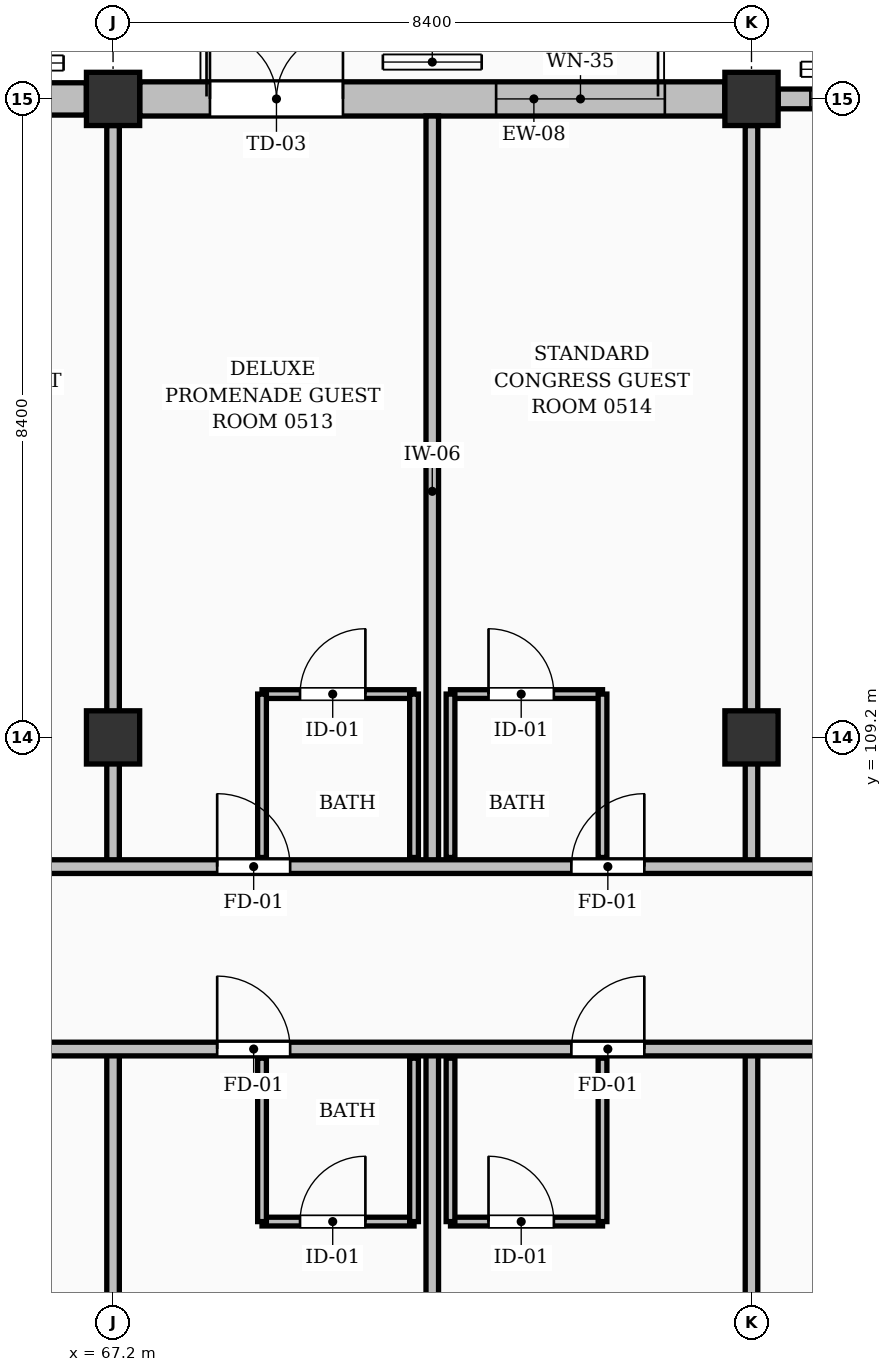
"""IFC4 building model, lengths in metres.
Left out: names, types, materials, properties, quantities, classifications, styles, units other than length and angle.
Written with IfcOpenShell. Run it as: python <this file> out.ifc"""

import sys

from ifc_helpers import new_model, si_unit, direction, frame, frame_2d, origin, origin_2d, place, context, subcontext, project, spatial, rectangle, extrude, element, fill, save


model = new_model("IFC4")
c1 = context("Model", 3, precision=1e-05, world=origin(), true_north=direction((0.0, 1.0)))
c2 = subcontext(c1, "Body", "Model", "MODEL_VIEW")
j1 = project(units=[si_unit("LENGTHUNIT", "METRE"), si_unit("PLANEANGLEUNIT", "RADIAN")], contexts=[c1])
p1 = place(None, origin())
s1 = spatial("IfcSite", under=j1, at=p1, CompositionType="ELEMENT")
p2 = place(p1, origin())
s2 = spatial("IfcBuilding", under=s1, at=p2, CompositionType="ELEMENT")
p3 = place(p2, frame((0.0, 0.0, 18.48)))
s3 = spatial("IfcBuildingStorey", under=s2, at=p3, CompositionType="ELEMENT", Elevation=18.48)
for number, where, z_axis, x_axis in (
    (1, (67.2, 109.2, 0.0), (0.0, 0.0, 1.0), (1.0, 0.0, 0.0)),
    (2, (67.2, 117.6, 0.0), (0.0, 0.0, 1.0), (1.0, 0.0, 0.0)),
    (3, (75.6, 109.2, 0.0), (0.0, 0.0, 1.0), (1.0, 0.0, 0.0)),
    (4, (75.6, 117.6, 0.0), (0.0, 0.0, 1.0), (1.0, 0.0, 0.0)),
):
    element("IfcColumn", number, at=place(p3, frame(where, z_axis=z_axis, x_axis=x_axis)), inside=s3, PredefinedType="COLUMN", context=c2, shape_type="SweptSolid", body=[
        extrude(rectangle(XDim=0.7, YDim=0.7, at=origin_2d()), origin(), (0.0, 0.0, 1.0), 3.36),
    ])
p4 = place(p3, frame((59.151, 117.6, 0.0), z_axis=(0.0, 0.0, 1.0), x_axis=(1.0, 0.0, 0.0)))
e5 = element("IfcWall", 5, at=p4, inside=s3, PredefinedType="SOLIDWALL", context=c2, shape_type="SweptSolid", body=[
    extrude(rectangle(XDim=7.698, YDim=0.425, at=frame_2d((3.849, 0.0))), origin(), (0.0, 0.0, 1.0), 2.494),
])
p5 = place(p4, frame((0.559, 0.0, 0.25)))
e6 = element("IfcOpeningElement", 6, at=p5, cuts=e5, PredefinedType="OPENING", context=c2, shape_type="SweptSolid", body=[
    extrude(rectangle(XDim=2.38, YDim=2.0, at=frame_2d((1.19, 1.0))), frame((0.0, 0.223, 0.0), z_axis=(0.0, -1.0, 0.0), x_axis=(1.0, 0.0, 0.0)), (0.0, 0.0, 1.0), 0.445),
])
p6 = place(p4, frame((4.774, 0.0, 0.25)))
e7 = element("IfcOpeningElement", 7, at=p6, cuts=e5, PredefinedType="OPENING", context=c2, shape_type="SweptSolid", body=[
    extrude(rectangle(XDim=2.35, YDim=1.85, at=frame_2d((1.175, 0.925))), frame((0.0, 0.223, 0.0), z_axis=(0.0, -1.0, 0.0), x_axis=(1.0, 0.0, 0.0)), (0.0, 0.0, 1.0), 0.445),
])
p7 = place(p3, frame((67.551, 117.6, 0.0), z_axis=(0.0, 0.0, 1.0), x_axis=(1.0, 0.0, 0.0)))
e8 = element("IfcWall", 8, at=p7, inside=s3, PredefinedType="SOLIDWALL", context=c2, shape_type="SweptSolid", body=[
    extrude(rectangle(XDim=7.698, YDim=0.45, at=frame_2d((3.849, 0.0))), origin(), (0.0, 0.0, 1.0), 2.414),
])
p8 = place(p7, frame((0.924, 0.0, 0.0)))
e9 = element("IfcOpeningElement", 9, at=p8, cuts=e8, PredefinedType="OPENING", context=c2, shape_type="SweptSolid", body=[
    extrude(rectangle(XDim=1.75, YDim=2.08, at=frame_2d((0.875, 1.04))), frame((0.0, 0.235, 0.0), z_axis=(0.0, -1.0, 0.0), x_axis=(1.0, 0.0, 0.0)), (0.0, 0.0, 1.0), 0.47),
])
p9 = place(p7, frame((4.689, 0.0, 0.25)))
e10 = element("IfcOpeningElement", 10, at=p9, cuts=e8, PredefinedType="OPENING", context=c2, shape_type="SweptSolid", body=[
    extrude(rectangle(XDim=2.22, YDim=1.9, at=frame_2d((1.11, 0.95))), frame((0.0, 0.235, 0.0), z_axis=(0.0, -1.0, 0.0), x_axis=(1.0, 0.0, 0.0)), (0.0, 0.0, 1.0), 0.47),
])
p10 = place(p3, frame((75.951, 117.6, 0.0), z_axis=(0.0, 0.0, 1.0), x_axis=(1.0, 0.0, 0.0)))
e11 = element("IfcWall", 11, at=p10, inside=s3, PredefinedType="SOLIDWALL", context=c2, shape_type="SweptSolid", body=[
    extrude(rectangle(XDim=7.698, YDim=0.26, at=frame_2d((3.849, 0.0))), origin(), (0.0, 0.0, 1.0), 2.414),
])
p11 = place(p10, frame((0.424, 0.0, 0.25)))
e12 = element("IfcOpeningElement", 12, at=p11, cuts=e11, PredefinedType="OPENING", context=c2, shape_type="SweptSolid", body=[
    extrude(rectangle(XDim=2.65, YDim=1.85, at=frame_2d((1.325, 0.925))), frame((0.0, 0.14, 0.0), z_axis=(0.0, -1.0, 0.0), x_axis=(1.0, 0.0, 0.0)), (0.0, 0.0, 1.0), 0.28),
])
p12 = place(p10, frame((4.724, 0.0, 0.25)))
e13 = element("IfcOpeningElement", 13, at=p12, cuts=e11, PredefinedType="OPENING", context=c2, shape_type="SweptSolid", body=[
    extrude(rectangle(XDim=2.45, YDim=1.95, at=frame_2d((1.225, 0.975))), frame((0.0, 0.14, 0.0), z_axis=(0.0, -1.0, 0.0), x_axis=(1.0, 0.0, 0.0)), (0.0, 0.0, 1.0), 0.28),
])
p13 = place(p3, frame((69.16, 109.77, 0.0), z_axis=(0.0, 0.0, 1.0), x_axis=(1.0, 0.0, 0.0)))
e14 = element("IfcWall", 14, at=p13, inside=s3, PredefinedType="PARTITIONING", context=c2, shape_type="SweptSolid", body=[
    extrude(rectangle(XDim=2.0, YDim=0.115, at=frame_2d((1.0, 0.0))), origin(), (0.0, 0.0, 1.0), 3.12),
])
p14 = place(p13, frame((0.5, 0.0, 0.0)))
e15 = element("IfcOpeningElement", 15, at=p14, cuts=e14, PredefinedType="OPENING", context=c2, shape_type="SweptSolid", body=[
    extrude(rectangle(XDim=0.86, YDim=2.05, at=frame_2d((0.43, 1.025))), frame((0.0, 0.067, 0.0), z_axis=(0.0, -1.0, 0.0), x_axis=(1.0, 0.0, 0.0)), (0.0, 0.0, 1.0), 0.135),
])
for number, where, z_axis, x_axis in (
    (16, (69.16, 107.62, 0.0), (0.0, 0.0, 1.0), (0.0, 1.0, 0.0)),
    (17, (71.16, 107.62, 0.0), (0.0, 0.0, 1.0), (0.0, 1.0, 0.0)),
):
    element("IfcWall", number, at=place(p3, frame(where, z_axis=z_axis, x_axis=x_axis)), inside=s3, PredefinedType="PARTITIONING", context=c2, shape_type="SweptSolid", body=[
        extrude(rectangle(XDim=2.15, YDim=0.115, at=frame_2d((1.075, 0.0))), origin(), (0.0, 0.0, 1.0), 3.12),
    ])
p15 = place(p3, frame((71.64, 109.77, 0.0), z_axis=(0.0, 0.0, 1.0), x_axis=(1.0, 0.0, 0.0)))
e18 = element("IfcWall", 18, at=p15, inside=s3, PredefinedType="PARTITIONING", context=c2, shape_type="SweptSolid", body=[
    extrude(rectangle(XDim=2.0, YDim=0.115, at=frame_2d((1.0, 0.0))), origin(), (0.0, 0.0, 1.0), 3.12),
])
p16 = place(p15, frame((0.5, 0.0, 0.0)))
e19 = element("IfcOpeningElement", 19, at=p16, cuts=e18, PredefinedType="OPENING", context=c2, shape_type="SweptSolid", body=[
    extrude(rectangle(XDim=0.86, YDim=2.05, at=frame_2d((0.43, 1.025))), frame((0.0, 0.067, 0.0), z_axis=(0.0, -1.0, 0.0), x_axis=(1.0, 0.0, 0.0)), (0.0, 0.0, 1.0), 0.135),
])
for number, where, z_axis, x_axis in (
    (20, (71.64, 107.62, 0.0), (0.0, 0.0, 1.0), (0.0, 1.0, 0.0)),
    (21, (73.64, 107.62, 0.0), (0.0, 0.0, 1.0), (0.0, 1.0, 0.0)),
):
    element("IfcWall", number, at=place(p3, frame(where, z_axis=z_axis, x_axis=x_axis)), inside=s3, PredefinedType="PARTITIONING", context=c2, shape_type="SweptSolid", body=[
        extrude(rectangle(XDim=2.15, YDim=0.115, at=frame_2d((1.075, 0.0))), origin(), (0.0, 0.0, 1.0), 3.12),
    ])
p17 = place(p3, frame((71.4, 107.5, 0.0), z_axis=(0.0, 0.0, 1.0), x_axis=(0.0, 1.0, 0.0)))
e22 = element("IfcWall", 22, at=p17, inside=s3, PredefinedType="PARTITIONING", context=c2, shape_type="SweptSolid", body=[
    extrude(rectangle(XDim=9.875, YDim=0.165, at=frame_2d((4.938, 0.0))), origin(), (0.0, 0.0, 1.0), 3.12),
])
for number, where, z_axis, x_axis in (
    (23, (67.2, 107.5, 0.0), (0.0, 0.0, 1.0), (0.0, 1.0, 0.0)),
    (24, (75.6, 107.5, 0.0), (0.0, 0.0, 1.0), (0.0, 1.0, 0.0)),
):
    element("IfcWall", number, at=place(p3, frame(where, z_axis=z_axis, x_axis=x_axis)), inside=s3, PredefinedType="PARTITIONING", context=c2, shape_type="SweptSolid", body=[
        extrude(rectangle(XDim=9.75, YDim=0.165, at=frame_2d((4.875, 0.0))), origin(), (0.0, 0.0, 1.0), 2.375),
    ])
p18 = place(p3, frame((40.66, 107.5, 0.0), z_axis=(0.0, 0.0, 1.0), x_axis=(1.0, 0.0, 0.0)))
e25 = element("IfcWall", 25, at=p18, inside=s3, PredefinedType="PARTITIONING", context=c2, shape_type="SweptSolid", body=[
    extrude(rectangle(XDim=43.21, YDim=0.18, at=frame_2d((21.605, 0.0))), origin(), (0.0, 0.0, 1.0), 3.12),
])
p19 = place(p18, frame((0.2, 0.0, 0.0)))
e26 = element("IfcOpeningElement", 26, at=p19, cuts=e25, PredefinedType="OPENING", context=c2, shape_type="SweptSolid", body=[
    extrude(rectangle(XDim=0.94, YDim=2.1, at=frame_2d((0.47, 1.05))), frame((0.0, 0.1, 0.0), z_axis=(0.0, -1.0, 0.0), x_axis=(1.0, 0.0, 0.0)), (0.0, 0.0, 1.0), 0.2),
])
p20 = place(p18, frame((2.71, 0.0, 0.0)))
e27 = element("IfcOpeningElement", 27, at=p20, cuts=e25, PredefinedType="OPENING", context=c2, shape_type="SweptSolid", body=[
    extrude(rectangle(XDim=0.96, YDim=2.15, at=frame_2d((0.48, 1.075))), frame((0.0, 0.1, 0.0), z_axis=(0.0, -1.0, 0.0), x_axis=(1.0, 0.0, 0.0)), (0.0, 0.0, 1.0), 0.2),
])
p21 = place(p18, frame((7.37, 0.0, 0.0)))
e28 = element("IfcOpeningElement", 28, at=p21, cuts=e25, PredefinedType="OPENING", context=c2, shape_type="SweptSolid", body=[
    extrude(rectangle(XDim=0.96, YDim=2.15, at=frame_2d((0.48, 1.075))), frame((0.0, 0.1, 0.0), z_axis=(0.0, -1.0, 0.0), x_axis=(1.0, 0.0, 0.0)), (0.0, 0.0, 1.0), 0.2),
])
p22 = place(p18, frame((11.11, 0.0, 0.0)))
e29 = element("IfcOpeningElement", 29, at=p22, cuts=e25, PredefinedType="OPENING", context=c2, shape_type="SweptSolid", body=[
    extrude(rectangle(XDim=0.96, YDim=2.15, at=frame_2d((0.48, 1.075))), frame((0.0, 0.1, 0.0), z_axis=(0.0, -1.0, 0.0), x_axis=(1.0, 0.0, 0.0)), (0.0, 0.0, 1.0), 0.2),
])
p23 = place(p18, frame((15.77, 0.0, 0.0)))
e30 = element("IfcOpeningElement", 30, at=p23, cuts=e25, PredefinedType="OPENING", context=c2, shape_type="SweptSolid", body=[
    extrude(rectangle(XDim=0.96, YDim=2.15, at=frame_2d((0.48, 1.075))), frame((0.0, 0.1, 0.0), z_axis=(0.0, -1.0, 0.0), x_axis=(1.0, 0.0, 0.0)), (0.0, 0.0, 1.0), 0.2),
])
p24 = place(p18, frame((19.51, 0.0, 0.0)))
e31 = element("IfcOpeningElement", 31, at=p24, cuts=e25, PredefinedType="OPENING", context=c2, shape_type="SweptSolid", body=[
    extrude(rectangle(XDim=0.96, YDim=2.15, at=frame_2d((0.48, 1.075))), frame((0.0, 0.1, 0.0), z_axis=(0.0, -1.0, 0.0), x_axis=(1.0, 0.0, 0.0)), (0.0, 0.0, 1.0), 0.2),
])
p25 = place(p18, frame((24.17, 0.0, 0.0)))
e32 = element("IfcOpeningElement", 32, at=p25, cuts=e25, PredefinedType="OPENING", context=c2, shape_type="SweptSolid", body=[
    extrude(rectangle(XDim=0.96, YDim=2.15, at=frame_2d((0.48, 1.075))), frame((0.0, 0.1, 0.0), z_axis=(0.0, -1.0, 0.0), x_axis=(1.0, 0.0, 0.0)), (0.0, 0.0, 1.0), 0.2),
])
p26 = place(p18, frame((27.91, 0.0, 0.0)))
e33 = element("IfcOpeningElement", 33, at=p26, cuts=e25, PredefinedType="OPENING", context=c2, shape_type="SweptSolid", body=[
    extrude(rectangle(XDim=0.96, YDim=2.15, at=frame_2d((0.48, 1.075))), frame((0.0, 0.1, 0.0), z_axis=(0.0, -1.0, 0.0), x_axis=(1.0, 0.0, 0.0)), (0.0, 0.0, 1.0), 0.2),
])
p27 = place(p18, frame((32.57, 0.0, 0.0)))
e34 = element("IfcOpeningElement", 34, at=p27, cuts=e25, PredefinedType="OPENING", context=c2, shape_type="SweptSolid", body=[
    extrude(rectangle(XDim=0.96, YDim=2.15, at=frame_2d((0.48, 1.075))), frame((0.0, 0.1, 0.0), z_axis=(0.0, -1.0, 0.0), x_axis=(1.0, 0.0, 0.0)), (0.0, 0.0, 1.0), 0.2),
])
p28 = place(p18, frame((36.44, 0.0, 0.0)))
e35 = element("IfcOpeningElement", 35, at=p28, cuts=e25, PredefinedType="OPENING", context=c2, shape_type="SweptSolid", body=[
    extrude(rectangle(XDim=1.02, YDim=2.15, at=frame_2d((0.51, 1.075))), frame((0.0, 0.1, 0.0), z_axis=(0.0, -1.0, 0.0), x_axis=(1.0, 0.0, 0.0)), (0.0, 0.0, 1.0), 0.2),
])
p29 = place(p3, frame((69.16, 102.83, 0.0), z_axis=(0.0, 0.0, 1.0), x_axis=(1.0, 0.0, 0.0)))
e36 = element("IfcWall", 36, at=p29, inside=s3, PredefinedType="PARTITIONING", context=c2, shape_type="SweptSolid", body=[
    extrude(rectangle(XDim=2.0, YDim=0.115, at=frame_2d((1.0, 0.0))), origin(), (0.0, 0.0, 1.0), 3.12),
])
p30 = place(p29, frame((0.5, 0.0, 0.0)))
e37 = element("IfcOpeningElement", 37, at=p30, cuts=e36, PredefinedType="OPENING", context=c2, shape_type="SweptSolid", body=[
    extrude(rectangle(XDim=0.86, YDim=2.05, at=frame_2d((0.43, 1.025))), frame((0.0, 0.067, 0.0), z_axis=(0.0, -1.0, 0.0), x_axis=(1.0, 0.0, 0.0)), (0.0, 0.0, 1.0), 0.135),
])
for number, where, z_axis, x_axis in (
    (38, (69.16, 102.83, 0.0), (0.0, 0.0, 1.0), (0.0, 1.0, 0.0)),
    (39, (71.16, 102.83, 0.0), (0.0, 0.0, 1.0), (0.0, 1.0, 0.0)),
):
    element("IfcWall", number, at=place(p3, frame(where, z_axis=z_axis, x_axis=x_axis)), inside=s3, PredefinedType="PARTITIONING", context=c2, shape_type="SweptSolid", body=[
        extrude(rectangle(XDim=2.15, YDim=0.115, at=frame_2d((1.075, 0.0))), origin(), (0.0, 0.0, 1.0), 3.12),
    ])
p31 = place(p3, frame((71.64, 102.83, 0.0), z_axis=(0.0, 0.0, 1.0), x_axis=(1.0, 0.0, 0.0)))
e40 = element("IfcWall", 40, at=p31, inside=s3, PredefinedType="PARTITIONING", context=c2, shape_type="SweptSolid", body=[
    extrude(rectangle(XDim=2.0, YDim=0.115, at=frame_2d((1.0, 0.0))), origin(), (0.0, 0.0, 1.0), 3.12),
])
p32 = place(p31, frame((0.5, 0.0, 0.0)))
e41 = element("IfcOpeningElement", 41, at=p32, cuts=e40, PredefinedType="OPENING", context=c2, shape_type="SweptSolid", body=[
    extrude(rectangle(XDim=0.86, YDim=2.05, at=frame_2d((0.43, 1.025))), frame((0.0, 0.067, 0.0), z_axis=(0.0, -1.0, 0.0), x_axis=(1.0, 0.0, 0.0)), (0.0, 0.0, 1.0), 0.135),
])
for number, where, z_axis, x_axis in (
    (42, (71.64, 102.83, 0.0), (0.0, 0.0, 1.0), (0.0, 1.0, 0.0)),
    (43, (73.64, 102.83, 0.0), (0.0, 0.0, 1.0), (0.0, 1.0, 0.0)),
):
    element("IfcWall", number, at=place(p3, frame(where, z_axis=z_axis, x_axis=x_axis)), inside=s3, PredefinedType="PARTITIONING", context=c2, shape_type="SweptSolid", body=[
        extrude(rectangle(XDim=2.15, YDim=0.115, at=frame_2d((1.075, 0.0))), origin(), (0.0, 0.0, 1.0), 3.12),
    ])
p33 = place(p3, frame((71.4, 92.625, 0.0), z_axis=(0.0, 0.0, 1.0), x_axis=(0.0, 1.0, 0.0)))
e44 = element("IfcWall", 44, at=p33, inside=s3, PredefinedType="PARTITIONING", context=c2, shape_type="SweptSolid", body=[
    extrude(rectangle(XDim=12.475, YDim=0.165, at=frame_2d((6.238, 0.0))), origin(), (0.0, 0.0, 1.0), 3.12),
])
for number, where, z_axis, x_axis in (
    (45, (67.2, 92.75, 0.0), (0.0, 0.0, 1.0), (0.0, 1.0, 0.0)),
    (46, (75.6, 92.75, 0.0), (0.0, 0.0, 1.0), (0.0, 1.0, 0.0)),
):
    element("IfcWall", number, at=place(p3, frame(where, z_axis=z_axis, x_axis=x_axis)), inside=s3, PredefinedType="PARTITIONING", context=c2, shape_type="SweptSolid", body=[
        extrude(rectangle(XDim=12.35, YDim=0.165, at=frame_2d((6.175, 0.0))), origin(), (0.0, 0.0, 1.0), 2.375),
    ])
p34 = place(p3, frame((54.4, 105.1, 0.0), z_axis=(0.0, 0.0, 1.0), x_axis=(1.0, 0.0, 0.0)))
e47 = element("IfcWall", 47, at=p34, inside=s3, PredefinedType="PARTITIONING", context=c2, shape_type="SweptSolid", body=[
    extrude(rectangle(XDim=29.47, YDim=0.18, at=frame_2d((14.735, 0.0))), origin(), (0.0, 0.0, 1.0), 3.12),
])
p35 = place(p34, frame((2.03, 0.0, 0.0)))
e48 = element("IfcOpeningElement", 48, at=p35, cuts=e47, PredefinedType="OPENING", context=c2, shape_type="SweptSolid", body=[
    extrude(rectangle(XDim=0.96, YDim=2.15, at=frame_2d((0.48, 1.075))), frame((0.0, 0.1, 0.0), z_axis=(0.0, -1.0, 0.0), x_axis=(1.0, 0.0, 0.0)), (0.0, 0.0, 1.0), 0.2),
])
p36 = place(p34, frame((5.77, 0.0, 0.0)))
e49 = element("IfcOpeningElement", 49, at=p36, cuts=e47, PredefinedType="OPENING", context=c2, shape_type="SweptSolid", body=[
    extrude(rectangle(XDim=0.96, YDim=2.15, at=frame_2d((0.48, 1.075))), frame((0.0, 0.1, 0.0), z_axis=(0.0, -1.0, 0.0), x_axis=(1.0, 0.0, 0.0)), (0.0, 0.0, 1.0), 0.2),
])
p37 = place(p34, frame((10.43, 0.0, 0.0)))
e50 = element("IfcOpeningElement", 50, at=p37, cuts=e47, PredefinedType="OPENING", context=c2, shape_type="SweptSolid", body=[
    extrude(rectangle(XDim=0.96, YDim=2.15, at=frame_2d((0.48, 1.075))), frame((0.0, 0.1, 0.0), z_axis=(0.0, -1.0, 0.0), x_axis=(1.0, 0.0, 0.0)), (0.0, 0.0, 1.0), 0.2),
])
p38 = place(p34, frame((14.17, 0.0, 0.0)))
e51 = element("IfcOpeningElement", 51, at=p38, cuts=e47, PredefinedType="OPENING", context=c2, shape_type="SweptSolid", body=[
    extrude(rectangle(XDim=0.96, YDim=2.15, at=frame_2d((0.48, 1.075))), frame((0.0, 0.1, 0.0), z_axis=(0.0, -1.0, 0.0), x_axis=(1.0, 0.0, 0.0)), (0.0, 0.0, 1.0), 0.2),
])
p39 = place(p34, frame((18.83, 0.0, 0.0)))
e52 = element("IfcOpeningElement", 52, at=p39, cuts=e47, PredefinedType="OPENING", context=c2, shape_type="SweptSolid", body=[
    extrude(rectangle(XDim=0.96, YDim=2.15, at=frame_2d((0.48, 1.075))), frame((0.0, 0.1, 0.0), z_axis=(0.0, -1.0, 0.0), x_axis=(1.0, 0.0, 0.0)), (0.0, 0.0, 1.0), 0.2),
])
p40 = place(p34, frame((22.7, 0.0, 0.0)))
e53 = element("IfcOpeningElement", 53, at=p40, cuts=e47, PredefinedType="OPENING", context=c2, shape_type="SweptSolid", body=[
    extrude(rectangle(XDim=1.02, YDim=2.15, at=frame_2d((0.51, 1.075))), frame((0.0, 0.1, 0.0), z_axis=(0.0, -1.0, 0.0), x_axis=(1.0, 0.0, 0.0)), (0.0, 0.0, 1.0), 0.2),
])
p41 = place(p8, origin())
e54 = element("IfcDoor", 54, at=p41, inside=s3, OperationType="DOUBLE_DOOR_SINGLE_SWING", PredefinedType="DOOR", context=c2, shape_type="SweptSolid", body=[
    extrude(rectangle(XDim=1.75, YDim=2.08, at=frame_2d((0.875, 1.04))), frame((0.0, 0.025, 0.0), z_axis=(0.0, -1.0, 0.0), x_axis=(1.0, 0.0, 0.0)), (0.0, 0.0, 1.0), 0.05),
])
fill(e9, e54)
p42 = place(p9, origin())
e55 = element("IfcWindow", 55, at=p42, inside=s3, PartitioningType="DOUBLE_PANEL_VERTICAL", PredefinedType="WINDOW", context=c2, shape_type="SweptSolid", body=[
    extrude(rectangle(XDim=2.22, YDim=1.9, at=frame_2d((1.11, 0.95))), frame((0.0, 0.03, 0.0), z_axis=(0.0, -1.0, 0.0), x_axis=(1.0, 0.0, 0.0)), (0.0, 0.0, 1.0), 0.06),
])
fill(e10, e55)
p43 = place(p11, origin())
e56 = element("IfcWindow", 56, at=p43, inside=s3, PartitioningType="DOUBLE_PANEL_VERTICAL", PredefinedType="WINDOW", context=c2, shape_type="SweptSolid", body=[
    extrude(rectangle(XDim=2.65, YDim=1.85, at=frame_2d((1.325, 0.925))), frame((0.0, 0.03, 0.0), z_axis=(0.0, -1.0, 0.0), x_axis=(1.0, 0.0, 0.0)), (0.0, 0.0, 1.0), 0.06),
])
fill(e12, e56)
p44 = place(p14, origin())
e57 = element("IfcDoor", 57, at=p44, inside=s3, OperationType="SINGLE_SWING_RIGHT", PredefinedType="DOOR", context=c2, shape_type="SweptSolid", body=[
    extrude(rectangle(XDim=0.86, YDim=2.05, at=frame_2d((0.43, 1.025))), frame((0.0, 0.025, 0.0), z_axis=(0.0, -1.0, 0.0), x_axis=(1.0, 0.0, 0.0)), (0.0, 0.0, 1.0), 0.05),
])
fill(e15, e57)
p45 = place(p16, origin())
e58 = element("IfcDoor", 58, at=p45, inside=s3, OperationType="SINGLE_SWING_LEFT", PredefinedType="DOOR", context=c2, shape_type="SweptSolid", body=[
    extrude(rectangle(XDim=0.86, YDim=2.05, at=frame_2d((0.43, 1.025))), frame((0.0, 0.025, 0.0), z_axis=(0.0, -1.0, 0.0), x_axis=(1.0, 0.0, 0.0)), (0.0, 0.0, 1.0), 0.05),
])
fill(e19, e58)
p46 = place(p26, origin())
e59 = element("IfcDoor", 59, at=p46, inside=s3, OperationType="SINGLE_SWING_LEFT", PredefinedType="DOOR", context=c2, shape_type="SweptSolid", body=[
    extrude(rectangle(XDim=0.96, YDim=2.15, at=frame_2d((0.48, 1.075))), frame((0.0, 0.025, 0.0), z_axis=(0.0, -1.0, 0.0), x_axis=(1.0, 0.0, 0.0)), (0.0, 0.0, 1.0), 0.05),
])
fill(e33, e59)
p47 = place(p27, origin())
e60 = element("IfcDoor", 60, at=p47, inside=s3, OperationType="SINGLE_SWING_RIGHT", PredefinedType="DOOR", context=c2, shape_type="SweptSolid", body=[
    extrude(rectangle(XDim=0.96, YDim=2.15, at=frame_2d((0.48, 1.075))), frame((0.0, 0.025, 0.0), z_axis=(0.0, -1.0, 0.0), x_axis=(1.0, 0.0, 0.0)), (0.0, 0.0, 1.0), 0.05),
])
fill(e34, e60)
p48 = place(p30, origin())
e61 = element("IfcDoor", 61, at=p48, inside=s3, OperationType="SINGLE_SWING_RIGHT", PredefinedType="DOOR", context=c2, shape_type="SweptSolid", body=[
    extrude(rectangle(XDim=0.86, YDim=2.05, at=frame_2d((0.43, 1.025))), frame((0.0, 0.025, 0.0), z_axis=(0.0, -1.0, 0.0), x_axis=(1.0, 0.0, 0.0)), (0.0, 0.0, 1.0), 0.05),
])
fill(e37, e61)
p49 = place(p32, origin())
e62 = element("IfcDoor", 62, at=p49, inside=s3, OperationType="SINGLE_SWING_LEFT", PredefinedType="DOOR", context=c2, shape_type="SweptSolid", body=[
    extrude(rectangle(XDim=0.86, YDim=2.05, at=frame_2d((0.43, 1.025))), frame((0.0, 0.025, 0.0), z_axis=(0.0, -1.0, 0.0), x_axis=(1.0, 0.0, 0.0)), (0.0, 0.0, 1.0), 0.05),
])
fill(e41, e62)
p50 = place(p38, origin())
e63 = element("IfcDoor", 63, at=p50, inside=s3, OperationType="SINGLE_SWING_LEFT", PredefinedType="DOOR", context=c2, shape_type="SweptSolid", body=[
    extrude(rectangle(XDim=0.96, YDim=2.15, at=frame_2d((0.48, 1.075))), frame((0.0, 0.025, 0.0), z_axis=(0.0, -1.0, 0.0), x_axis=(1.0, 0.0, 0.0)), (0.0, 0.0, 1.0), 0.05),
])
fill(e51, e63)
p51 = place(p39, origin())
e64 = element("IfcDoor", 64, at=p51, inside=s3, OperationType="SINGLE_SWING_RIGHT", PredefinedType="DOOR", context=c2, shape_type="SweptSolid", body=[
    extrude(rectangle(XDim=0.96, YDim=2.15, at=frame_2d((0.48, 1.075))), frame((0.0, 0.025, 0.0), z_axis=(0.0, -1.0, 0.0), x_axis=(1.0, 0.0, 0.0)), (0.0, 0.0, 1.0), 0.05),
])
fill(e52, e64)
save(model, sys.argv[1])
